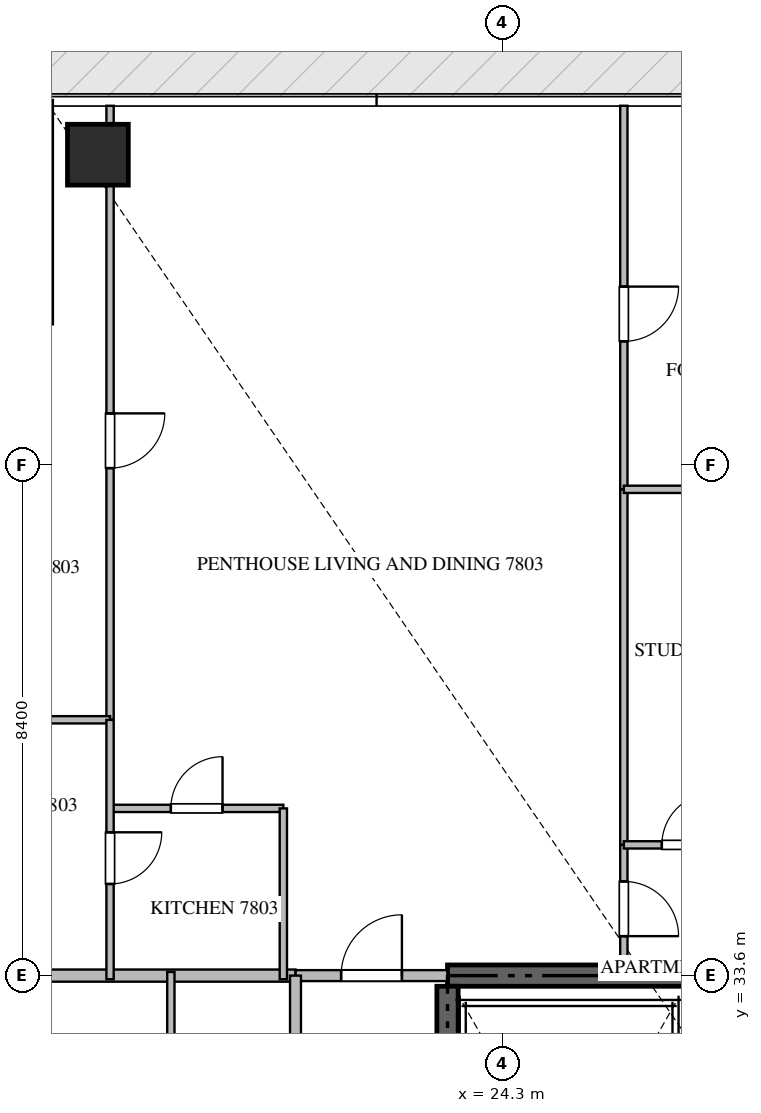
"""IFC4 building model, lengths in metres.
Left out: names, types, materials, properties, quantities, classifications, styles, units other than length and angle.
Written with IfcOpenShell. Run it as: python <this file> out.ifc"""

import sys

from ifc_helpers import new_model, si_unit, direction, frame, frame_2d, origin, origin_2d, place, context, subcontext, project, spatial, rectangle, extrude, source, transform, mapped, element, fill, save


model = new_model("IFC4")
c1 = context("Model", 3, precision=1e-05, world=origin(), true_north=direction((0.0, 1.0)))
c2 = subcontext(c1, "Body", "Model", "MODEL_VIEW")
j1 = project(units=[si_unit("LENGTHUNIT", "METRE"), si_unit("PLANEANGLEUNIT", "RADIAN")], contexts=[c1])
p1 = place(None, origin())
s1 = spatial("IfcSite", under=j1, at=p1, CompositionType="ELEMENT")
p2 = place(p1, origin())
s2 = spatial("IfcBuilding", under=s1, at=p2, CompositionType="ELEMENT")
p3 = place(p2, frame((0.0, 0.0, 313.7)))
s3 = spatial("IfcBuildingStorey", under=s2, at=p3, CompositionType="ELEMENT", Elevation=313.7)
p4 = place(p3, frame((41.4, 33.6, -0.26), z_axis=(0.0, 0.0, 1.0), x_axis=(-1.0, 0.0, 0.0)))
e1 = element("IfcWall", 1, at=p4, inside=s3, PredefinedType="SHEAR", context=c2, shape_type="SweptSolid", body=[
    extrude(rectangle(XDim=18.0, YDim=0.35, at=frame_2d((9.0, 0.0))), origin(), (0.0, 0.0, 1.0), 4.048),
])
p5 = place(p3, frame((23.4, 24.25, -0.26), z_axis=(0.0, 0.0, 1.0), x_axis=(0.0, 1.0, 0.0)))
e2 = element("IfcWall", 2, at=p5, inside=s3, PredefinedType="SHEAR", context=c2, shape_type="SweptSolid", body=[
    extrude(rectangle(XDim=9.175, YDim=0.35, at=frame_2d((4.587, 0.0))), origin(), (0.0, 0.0, 1.0), 4.048),
])
m1 = source(origin(), c2, "Body", "SweptSolid", [
    extrude(rectangle(XDim=1.0, YDim=1.0, at=origin_2d()), origin(), (0.0, 0.0, 1.0), 4.05),
])
p6 = place(p3, frame((17.65, 47.1, -0.26), z_axis=(0.0, 0.0, 1.0), x_axis=(1.0, 0.0, 0.0)))
e3 = element("IfcColumn", 3, at=p6, inside=s3, PredefinedType="COLUMN", context=c2, shape_type="MappedRepresentation", body=[
    mapped(m1, transform((0.0, 0.0, 0.0), scale=1.0)),
])
p7 = place(p3, frame((16.8, 48.0, 0.0), z_axis=(0.0, 0.0, 1.0), x_axis=(0.0, -1.0, 0.0)))
e4 = element("IfcWall", 4, at=p7, inside=s3, PredefinedType="ELEMENTEDWALL", context=c2, shape_type="SweptSolid", body=[
    extrude(rectangle(XDim=3.69, YDim=0.22, at=frame_2d((1.845, 0.0))), origin(), (0.0, 0.0, 1.0), 3.775),
])
p8 = place(p7, frame((1.043, 0.0, 0.65)))
e5 = element("IfcOpeningElement", 5, at=p8, cuts=e4, PredefinedType="OPENING", context=c2, shape_type="SweptSolid", body=[
    extrude(rectangle(XDim=2.2, YDim=2.4, at=frame_2d((1.1, 1.2))), frame((0.0, 0.12, 0.0), z_axis=(0.0, -1.0, 0.0), x_axis=(1.0, 0.0, 0.0)), (0.0, 0.0, 1.0), 0.24),
])
p9 = place(p3, frame((9.282, 33.6, 0.0), z_axis=(0.0, 0.0, 1.0), x_axis=(1.0, 0.0, 0.0)))
e6 = element("IfcWall", 6, at=p9, inside=s3, PredefinedType="PARTITIONING", context=c2, shape_type="SweptSolid", body=[
    extrude(rectangle(XDim=11.618, YDim=0.2, at=frame_2d((5.809, 0.0))), origin(), (0.0, 0.0, 1.0), 3.79),
])
p10 = place(p3, frame((20.902, 33.6, 0.0), z_axis=(0.0, 0.0, 1.0), x_axis=(1.0, 0.0, 0.0)))
e7 = element("IfcWall", 7, at=p10, inside=s3, PredefinedType="PARTITIONING", context=c2, shape_type="SweptSolid", body=[
    extrude(rectangle(XDim=2.496, YDim=0.18, at=frame_2d((1.248, 0.0))), origin(), (0.0, 0.0, 1.0), 3.79),
])
p11 = place(p10, frame((0.748, 0.0, 0.0)))
e8 = element("IfcOpeningElement", 8, at=p11, cuts=e7, PredefinedType="OPENING", context=c2, shape_type="SweptSolid", body=[
    extrude(rectangle(XDim=1.0, YDim=2.15, at=frame_2d((0.5, 1.075))), frame((0.0, 0.1, 0.0), z_axis=(0.0, -1.0, 0.0), x_axis=(1.0, 0.0, 0.0)), (0.0, 0.0, 1.0), 0.2),
])
p12 = place(p3, frame((20.9, 16.8, 0.0), z_axis=(0.0, 0.0, 1.0), x_axis=(0.0, 1.0, 0.0)))
e9 = element("IfcWall", 9, at=p12, inside=s3, PredefinedType="PARTITIONING", context=c2, shape_type="SweptSolid", body=[
    extrude(rectangle(XDim=16.8, YDim=0.18, at=frame_2d((8.4, 0.0))), origin(), (0.0, 0.0, 1.0), 3.79),
])
p13 = place(p12, frame((4.503, 0.0, 0.0)))
e10 = element("IfcOpeningElement", 10, at=p13, cuts=e9, PredefinedType="OPENING", context=c2, shape_type="SweptSolid", body=[
    extrude(rectangle(XDim=1.0, YDim=2.15, at=frame_2d((0.5, 1.075))), frame((0.0, 0.1, 0.0), z_axis=(0.0, -1.0, 0.0), x_axis=(1.0, 0.0, 0.0)), (0.0, 0.0, 1.0), 0.2),
])
p14 = place(p12, frame((8.706, 0.0, 0.0)))
e11 = element("IfcOpeningElement", 11, at=p14, cuts=e9, PredefinedType="OPENING", context=c2, shape_type="SweptSolid", body=[
    extrude(rectangle(XDim=1.0, YDim=2.15, at=frame_2d((0.5, 1.075))), frame((0.0, 0.1, 0.0), z_axis=(0.0, -1.0, 0.0), x_axis=(1.0, 0.0, 0.0)), (0.0, 0.0, 1.0), 0.2),
])
p15 = place(p3, frame((17.85, 36.35, 0.0), z_axis=(0.0, 0.0, 1.0), x_axis=(1.0, 0.0, 0.0)))
e12 = element("IfcWall", 12, at=p15, inside=s3, PredefinedType="PARTITIONING", context=c2, shape_type="SweptSolid", body=[
    extrude(rectangle(XDim=2.85, YDim=0.12, at=frame_2d((1.425, 0.0))), origin(), (0.0, 0.0, 1.0), 3.79),
])
p16 = place(p15, frame((1.0, 0.0, 0.0)))
e13 = element("IfcOpeningElement", 13, at=p16, cuts=e12, PredefinedType="OPENING", context=c2, shape_type="SweptSolid", body=[
    extrude(rectangle(XDim=0.85, YDim=2.1, at=frame_2d((0.425, 1.05))), frame((0.0, 0.07, 0.0), z_axis=(0.0, -1.0, 0.0), x_axis=(1.0, 0.0, 0.0)), (0.0, 0.0, 1.0), 0.14),
])
p17 = place(p3, frame((20.7, 36.35, 0.0), z_axis=(0.0, 0.0, 1.0), x_axis=(0.0, -1.0, 0.0)))
e14 = element("IfcWall", 14, at=p17, inside=s3, PredefinedType="PARTITIONING", context=c2, shape_type="SweptSolid", body=[
    extrude(rectangle(XDim=2.81, YDim=0.12, at=frame_2d((1.405, 0.0))), origin(), (0.0, 0.0, 1.0), 3.79),
])
p18 = place(p3, frame((17.85, 47.905, 0.0), z_axis=(0.0, 0.0, 1.0), x_axis=(0.0, -1.0, 0.0)))
e15 = element("IfcWall", 15, at=p18, inside=s3, PredefinedType="PARTITIONING", context=c2, shape_type="SweptSolid", body=[
    extrude(rectangle(XDim=10.098, YDim=0.12, at=frame_2d((5.049, 0.0))), origin(), (0.0, 0.0, 1.0), 3.292),
])
p19 = place(p18, frame((5.059, 0.0, 0.0)))
e16 = element("IfcOpeningElement", 16, at=p19, cuts=e15, PredefinedType="OPENING", context=c2, shape_type="SweptSolid", body=[
    extrude(rectangle(XDim=0.9, YDim=2.1, at=frame_2d((0.45, 1.05))), frame((0.0, 0.07, 0.0), z_axis=(0.0, -1.0, 0.0), x_axis=(1.0, 0.0, 0.0)), (0.0, 0.0, 1.0), 0.14),
])
p20 = place(p3, frame((14.752, 37.807, 0.0), z_axis=(0.0, 0.0, 1.0), x_axis=(1.0, 0.0, 0.0)))
e17 = element("IfcWall", 17, at=p20, inside=s3, PredefinedType="PARTITIONING", context=c2, shape_type="SweptSolid", body=[
    extrude(rectangle(XDim=3.098, YDim=0.12, at=frame_2d((1.549, 0.0))), origin(), (0.0, 0.0, 1.0), 3.79),
])
p21 = place(p3, frame((17.85, 37.805, 0.0), z_axis=(0.0, 0.0, 1.0), x_axis=(0.0, -1.0, 0.0)))
e18 = element("IfcWall", 18, at=p21, inside=s3, PredefinedType="PARTITIONING", context=c2, shape_type="SweptSolid", body=[
    extrude(rectangle(XDim=4.265, YDim=0.12, at=frame_2d((2.132, 0.0))), origin(), (0.0, 0.0, 1.0), 3.372),
])
p22 = place(p21, frame((1.848, 0.0, 0.0)))
e19 = element("IfcOpeningElement", 19, at=p22, cuts=e18, PredefinedType="OPENING", context=c2, shape_type="SweptSolid", body=[
    extrude(rectangle(XDim=0.85, YDim=2.1, at=frame_2d((0.425, 1.05))), frame((0.0, 0.07, 0.0), z_axis=(0.0, -1.0, 0.0), x_axis=(1.0, 0.0, 0.0)), (0.0, 0.0, 1.0), 0.14),
])
p23 = place(p3, frame((26.3, 35.75, 0.0), z_axis=(0.0, 0.0, 1.0), x_axis=(0.0, -1.0, 0.0)))
e20 = element("IfcWall", 20, at=p23, inside=s3, PredefinedType="PARTITIONING", context=c2, shape_type="SweptSolid", body=[
    extrude(rectangle(XDim=1.975, YDim=0.12, at=frame_2d((0.988, 0.0))), origin(), (0.0, 0.0, 1.0), 3.79),
])
p24 = place(p23, frame((0.601, 0.0, 0.0)))
e21 = element("IfcOpeningElement", 21, at=p24, cuts=e20, PredefinedType="OPENING", context=c2, shape_type="SweptSolid", body=[
    extrude(rectangle(XDim=0.9, YDim=2.1, at=frame_2d((0.45, 1.05))), frame((0.0, 0.07, 0.0), z_axis=(0.0, -1.0, 0.0), x_axis=(1.0, 0.0, 0.0)), (0.0, 0.0, 1.0), 0.14),
])
p25 = place(p3, frame((26.3, 47.905, 0.0), z_axis=(0.0, 0.0, 1.0), x_axis=(0.0, -1.0, 0.0)))
e22 = element("IfcWall", 22, at=p25, inside=s3, PredefinedType="PARTITIONING", context=c2, shape_type="SweptSolid", body=[
    extrude(rectangle(XDim=6.308, YDim=0.12, at=frame_2d((3.154, 0.0))), origin(), (0.0, 0.0, 1.0), 3.79),
])
p26 = place(p25, frame((2.974, 0.0, 0.0)))
e23 = element("IfcOpeningElement", 23, at=p26, cuts=e22, PredefinedType="OPENING", context=c2, shape_type="SweptSolid", body=[
    extrude(rectangle(XDim=0.9, YDim=2.1, at=frame_2d((0.45, 1.05))), frame((0.0, 0.07, 0.0), z_axis=(0.0, -1.0, 0.0), x_axis=(1.0, 0.0, 0.0)), (0.0, 0.0, 1.0), 0.14),
])
p27 = place(p3, frame((26.3, 41.595, 0.0), z_axis=(0.0, 0.0, 1.0), x_axis=(0.0, -1.0, 0.0)))
e24 = element("IfcWall", 24, at=p27, inside=s3, PredefinedType="PARTITIONING", context=c2, shape_type="SweptSolid", body=[
    extrude(rectangle(XDim=5.843, YDim=0.12, at=frame_2d((2.921, 0.0))), origin(), (0.0, 0.0, 1.0), 3.79),
])
p28 = place(p3, frame((26.3, 41.597, 0.0), z_axis=(0.0, 0.0, 1.0), x_axis=(1.0, 0.0, 0.0)))
e25 = element("IfcWall", 25, at=p28, inside=s3, PredefinedType="PARTITIONING", context=c2, shape_type="SweptSolid", body=[
    extrude(rectangle(XDim=5.12, YDim=0.12, at=frame_2d((2.56, 0.0))), origin(), (0.0, 0.0, 1.0), 3.79),
])
p29 = place(p3, frame((26.3, 35.75, 0.0), z_axis=(0.0, 0.0, 1.0), x_axis=(1.0, 0.0, 0.0)))
e26 = element("IfcWall", 26, at=p29, inside=s3, PredefinedType="PARTITIONING", context=c2, shape_type="SweptSolid", body=[
    extrude(rectangle(XDim=2.1, YDim=0.12, at=frame_2d((1.05, 0.0))), origin(), (0.0, 0.0, 1.0), 3.79),
])
p30 = place(p29, frame((0.625, 0.0, 0.0)))
e27 = element("IfcOpeningElement", 27, at=p30, cuts=e26, PredefinedType="OPENING", context=c2, shape_type="SweptSolid", body=[
    extrude(rectangle(XDim=0.85, YDim=2.1, at=frame_2d((0.425, 1.05))), frame((0.0, 0.07, 0.0), z_axis=(0.0, -1.0, 0.0), x_axis=(1.0, 0.0, 0.0)), (0.0, 0.0, 1.0), 0.14),
])
p31 = place(p3, frame((18.85, 27.8, 0.0), z_axis=(0.0, 0.0, 1.0), x_axis=(0.0, 1.0, 0.0)))
e28 = element("IfcWall", 28, at=p31, inside=s3, PredefinedType="PARTITIONING", context=c2, shape_type="SweptSolid", body=[
    extrude(rectangle(XDim=5.86, YDim=0.12, at=frame_2d((2.93, 0.0))), origin(), (0.0, 0.0, 1.0), 3.79),
])
m2 = source(origin(), c2, "Body", "SweptSolid", [
    extrude(rectangle(XDim=1.0, YDim=2.15, at=frame_2d((0.5, 1.075))), frame((0.0, 0.025, 0.0), z_axis=(0.0, -1.0, 0.0), x_axis=(1.0, 0.0, 0.0)), (0.0, 0.0, 1.0), 0.05),
])
p32 = place(p11, origin())
e29 = element("IfcDoor", 29, at=p32, inside=s3, OperationType="SINGLE_SWING_RIGHT", PredefinedType="DOOR", context=c2, shape_type="MappedRepresentation", body=[
    mapped(m2, transform((0.0, 0.0, 0.0), scale=1.0)),
])
fill(e8, e29)
m3 = source(origin(), c2, "Body", "SweptSolid", [
    extrude(rectangle(XDim=0.85, YDim=2.1, at=frame_2d((0.425, 1.05))), frame((0.0, 0.025, 0.0), z_axis=(0.0, -1.0, 0.0), x_axis=(1.0, 0.0, 0.0)), (0.0, 0.0, 1.0), 0.05),
])
p33 = place(p16, origin())
e30 = element("IfcDoor", 30, at=p33, inside=s3, OperationType="SINGLE_SWING_RIGHT", PredefinedType="DOOR", context=c2, shape_type="MappedRepresentation", body=[
    mapped(m3, transform((0.0, 0.0, 0.0), scale=1.0)),
])
fill(e13, e30)
m4 = source(origin(), c2, "Body", "SweptSolid", [
    extrude(rectangle(XDim=0.9, YDim=2.1, at=frame_2d((0.45, 1.05))), frame((0.0, 0.025, 0.0), z_axis=(0.0, -1.0, 0.0), x_axis=(1.0, 0.0, 0.0)), (0.0, 0.0, 1.0), 0.05),
])
p34 = place(p19, origin())
e31 = element("IfcDoor", 31, at=p34, inside=s3, OperationType="SINGLE_SWING_LEFT", PredefinedType="DOOR", context=c2, shape_type="MappedRepresentation", body=[
    mapped(m4, transform((0.0, 0.0, 0.0), scale=1.0)),
])
fill(e16, e31)
p35 = place(p22, origin())
e32 = element("IfcDoor", 32, at=p35, inside=s3, OperationType="SINGLE_SWING_LEFT", PredefinedType="DOOR", context=c2, shape_type="MappedRepresentation", body=[
    mapped(m3, transform((0.0, 0.0, 0.0), scale=1.0)),
])
fill(e19, e32)
p36 = place(p24, origin())
e33 = element("IfcDoor", 33, at=p36, inside=s3, OperationType="SINGLE_SWING_RIGHT", PredefinedType="DOOR", context=c2, shape_type="MappedRepresentation", body=[
    mapped(m4, transform((0.0, 0.0, 0.0), scale=1.0)),
])
fill(e21, e33)
p37 = place(p26, origin())
e34 = element("IfcDoor", 34, at=p37, inside=s3, OperationType="SINGLE_SWING_LEFT", PredefinedType="DOOR", context=c2, shape_type="MappedRepresentation", body=[
    mapped(m4, transform((0.0, 0.0, 0.0), scale=1.0)),
])
fill(e23, e34)
p38 = place(p30, origin())
e35 = element("IfcDoor", 35, at=p38, inside=s3, OperationType="SINGLE_SWING_RIGHT", PredefinedType="DOOR", context=c2, shape_type="MappedRepresentation", body=[
    mapped(m3, transform((0.0, 0.0, 0.0), scale=1.0)),
])
fill(e27, e35)
save(model, sys.argv[1])
